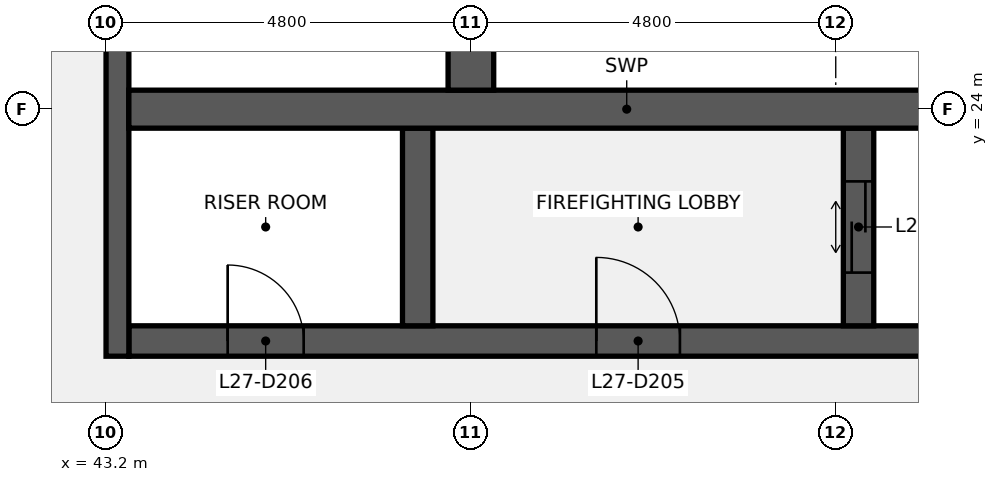
"""IFC4 building model, lengths in metres.
Left out: names, types, materials, properties, quantities, classifications, styles, units other than length and angle.
Written with IfcOpenShell. Run it as: python <this file> out.ifc"""

import sys

from ifc_helpers import new_model, si_unit, direction, frame, frame_2d, origin, place, context, subcontext, project, spatial, rectangle, extrude, element, fill, save


model = new_model("IFC4")
c1 = context("Model", 3, precision=1e-05, world=origin(), true_north=direction((0.0, 1.0)))
c2 = subcontext(c1, "Body", "Model", "MODEL_VIEW")
j1 = project(units=[si_unit("LENGTHUNIT", "METRE"), si_unit("PLANEANGLEUNIT", "RADIAN")], contexts=[c1])
p1 = place(None, origin())
s1 = spatial("IfcSite", under=j1, at=p1, CompositionType="ELEMENT")
p2 = place(p1, origin())
s2 = spatial("IfcBuilding", under=s1, at=p2, CompositionType="ELEMENT")
p3 = place(p2, frame((0.0, 0.0, 128.1)))
s3 = spatial("IfcBuildingStorey", under=s2, at=p3, CompositionType="ELEMENT", Elevation=128.1)
p4 = place(p3, frame((43.5, 20.95, 0.0), z_axis=(0.0, 0.0, 1.0), x_axis=(1.0, 0.0, 0.0)))
e1 = element("IfcWall", 1, at=p4, inside=s3, PredefinedType="SHEAR", context=c2, shape_type="SweptSolid", body=[
    extrude(rectangle(XDim=13.1, YDim=0.4, at=frame_2d((6.55, 0.0))), origin(), (0.0, 0.0, 1.0), 3.84),
])
p5 = place(p4, frame((6.15, 0.0, 0.0)))
e2 = element("IfcOpeningElement", 2, at=p5, cuts=e1, PredefinedType="OPENING", context=c2, shape_type="SweptSolid", body=[
    extrude(rectangle(XDim=1.1, YDim=2.1, at=frame_2d((0.55, 1.05))), frame((0.0, 0.21, 0.0), z_axis=(0.0, -1.0, 0.0), x_axis=(1.0, 0.0, 0.0)), (0.0, 0.0, 1.0), 0.42),
])
p6 = place(p4, frame((1.3, 0.0, 0.0)))
e3 = element("IfcOpeningElement", 3, at=p6, cuts=e1, PredefinedType="OPENING", context=c2, shape_type="SweptSolid", body=[
    extrude(rectangle(XDim=1.0, YDim=2.1, at=frame_2d((0.5, 1.05))), frame((0.0, 0.21, 0.0), z_axis=(0.0, -1.0, 0.0), x_axis=(1.0, 0.0, 0.0)), (0.0, 0.0, 1.0), 0.42),
])
p7 = place(p3, frame((43.35, 20.75, 0.0), z_axis=(0.0, 0.0, 1.0), x_axis=(0.0, 1.0, 0.0)))
e4 = element("IfcWall", 4, at=p7, inside=s3, PredefinedType="SHEAR", context=c2, shape_type="SweptSolid", body=[
    extrude(rectangle(XDim=6.5, YDim=0.3, at=frame_2d((3.25, 0.0))), origin(), (0.0, 0.0, 1.0), 3.84),
])
p8 = place(p3, frame((53.1, 21.15, 0.0), z_axis=(0.0, 0.0, 1.0), x_axis=(0.0, 1.0, 0.0)))
e5 = element("IfcWall", 5, at=p8, inside=s3, PredefinedType="SHEAR", context=c2, shape_type="SweptSolid", body=[
    extrude(rectangle(XDim=2.6, YDim=0.4, at=frame_2d((1.3, 0.0))), origin(), (0.0, 0.0, 1.0), 3.84),
])
p9 = place(p8, frame((0.7, 0.0, 0.0)))
e6 = element("IfcOpeningElement", 6, at=p9, cuts=e5, PredefinedType="OPENING", context=c2, shape_type="SweptSolid", body=[
    extrude(rectangle(XDim=1.2, YDim=2.1, at=frame_2d((0.6, 1.05))), frame((0.0, 0.21, 0.0), z_axis=(0.0, -1.0, 0.0), x_axis=(1.0, 0.0, 0.0)), (0.0, 0.0, 1.0), 0.42),
])
p10 = place(p3, frame((47.3, 21.15, 0.0), z_axis=(0.0, 0.0, 1.0), x_axis=(0.0, 1.0, 0.0)))
e7 = element("IfcWall", 7, at=p10, inside=s3, PredefinedType="SHEAR", context=c2, shape_type="SweptSolid", body=[
    extrude(rectangle(XDim=2.6, YDim=0.4, at=frame_2d((1.3, 0.0))), origin(), (0.0, 0.0, 1.0), 3.84),
])
p11 = place(p3, frame((43.5, 24.0, 0.0), z_axis=(0.0, 0.0, 1.0), x_axis=(1.0, 0.0, 0.0)))
e8 = element("IfcWall", 8, at=p11, inside=s3, PredefinedType="SHEAR", context=c2, shape_type="SweptSolid", body=[
    extrude(rectangle(XDim=13.1, YDim=0.5, at=frame_2d((6.55, 0.0))), origin(), (0.0, 0.0, 1.0), 3.84),
])
p12 = place(p3, frame((48.0, 24.25, 0.0), z_axis=(0.0, 0.0, 1.0), x_axis=(0.0, 1.0, 0.0)))
e9 = element("IfcWall", 9, at=p12, inside=s3, PredefinedType="SHEAR", context=c2, shape_type="SweptSolid", body=[
    extrude(rectangle(XDim=2.6, YDim=0.6, at=frame_2d((1.3, 0.0))), origin(), (0.0, 0.0, 1.0), 3.84),
])
p13 = place(p5, origin())
e10 = element("IfcDoor", 10, at=p13, inside=s3, OperationType="SINGLE_SWING_LEFT", PredefinedType="DOOR", context=c2, shape_type="SweptSolid", body=[
    extrude(rectangle(XDim=1.1, YDim=2.1, at=frame_2d((0.55, 1.05))), frame((0.0, 0.025, 0.0), z_axis=(0.0, -1.0, 0.0), x_axis=(1.0, 0.0, 0.0)), (0.0, 0.0, 1.0), 0.05),
])
fill(e2, e10)
p14 = place(p6, origin())
e11 = element("IfcDoor", 11, at=p14, inside=s3, OperationType="SINGLE_SWING_LEFT", PredefinedType="DOOR", context=c2, shape_type="SweptSolid", body=[
    extrude(rectangle(XDim=1.0, YDim=2.1, at=frame_2d((0.5, 1.05))), frame((0.0, 0.025, 0.0), z_axis=(0.0, -1.0, 0.0), x_axis=(1.0, 0.0, 0.0)), (0.0, 0.0, 1.0), 0.05),
])
fill(e3, e11)
p15 = place(p9, origin())
e12 = element("IfcDoor", 12, at=p15, inside=s3, OperationType="DOUBLE_DOOR_SLIDING", PredefinedType="DOOR", context=c2, shape_type="SweptSolid", body=[
    extrude(rectangle(XDim=1.2, YDim=2.1, at=frame_2d((0.6, 1.05))), frame((0.0, 0.025, 0.0), z_axis=(0.0, -1.0, 0.0), x_axis=(1.0, 0.0, 0.0)), (0.0, 0.0, 1.0), 0.05),
])
fill(e6, e12)
save(model, sys.argv[1])
